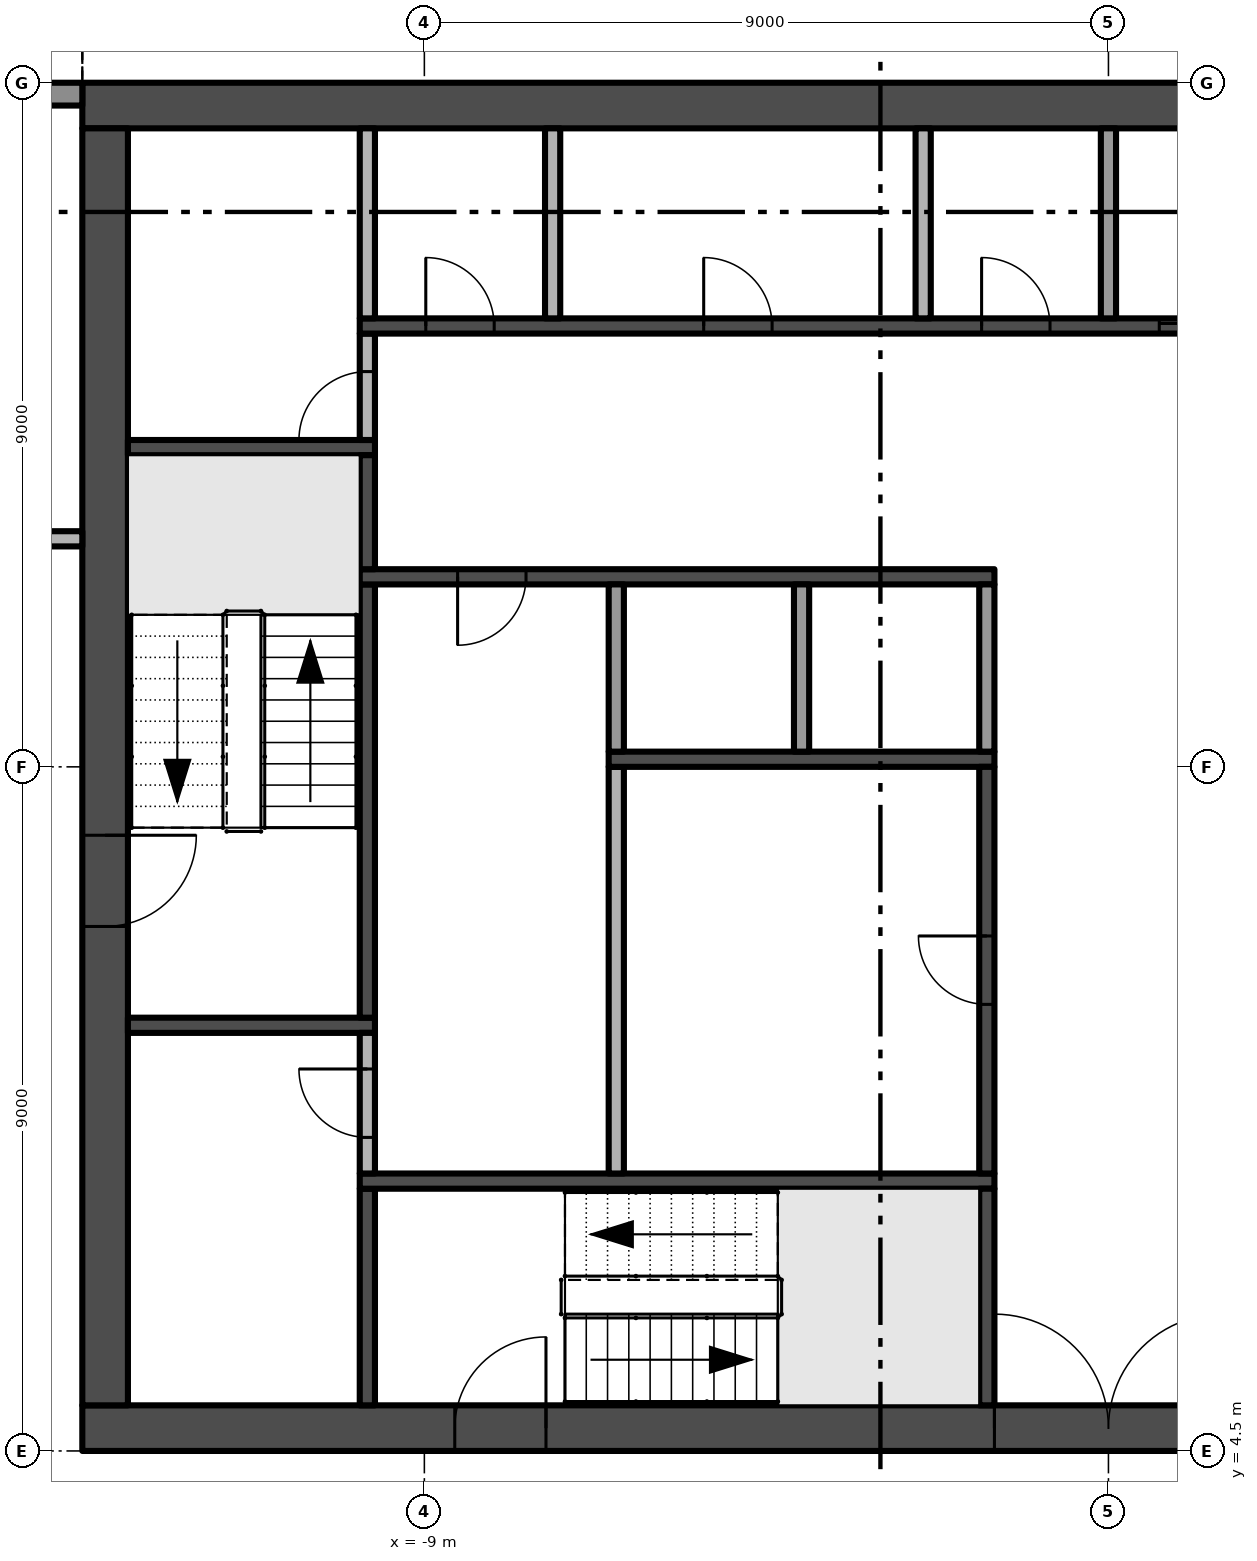
"""IFC4 building model, lengths in metres.
Left out: names, types, materials, properties, quantities, classifications, styles, units other than length and angle.
Written with IfcOpenShell. Run it as: python <this file> out.ifc"""

import sys

from ifc_helpers import new_model, si_unit, direction, frame, frame_2d, origin, place, context, subcontext, project, spatial, polyline, rectangle, outline, extrude, element, fill, save


model = new_model("IFC4")
c1 = context("Model", 3, precision=1e-05, world=origin(), true_north=direction((0.0, 1.0)))
c2 = subcontext(c1, "Body", "Model", "MODEL_VIEW")
j1 = project(units=[si_unit("LENGTHUNIT", "METRE"), si_unit("PLANEANGLEUNIT", "RADIAN")], contexts=[c1])
p1 = place(None, origin())
s1 = spatial("IfcSite", under=j1, at=p1, CompositionType="ELEMENT")
p2 = place(p1, origin())
s2 = spatial("IfcBuilding", under=s1, at=p2, CompositionType="ELEMENT")
p3 = place(p2, frame((0.0, 0.0, 250.2)))
s3 = spatial("IfcBuildingStorey", under=s2, at=p3, CompositionType="ELEMENT", Elevation=250.2)
p4 = place(p3, frame((-13.5, 4.8, -0.3), z_axis=(0.0, 0.0, 1.0), x_axis=(1.0, 0.0, 0.0)))
e1 = element("IfcWall", 1, at=p4, inside=s3, PredefinedType="SHEAR", context=c2, shape_type="SweptSolid", body=[
    extrude(rectangle(XDim=27.0, YDim=0.6, at=frame_2d((13.5, 0.0))), origin(), (0.0, 0.0, 1.0), 3.8),
])
p5 = place(p4, frame((12.0, 0.0, 0.3)))
e2 = element("IfcOpeningElement", 2, at=p5, cuts=e1, PredefinedType="OPENING", context=c2, shape_type="SweptSolid", body=[
    extrude(rectangle(XDim=3.0, YDim=2.4, at=frame_2d((1.5, 1.2))), frame((0.0, 0.31, 0.0), z_axis=(0.0, -1.0, 0.0), x_axis=(1.0, 0.0, 0.0)), (0.0, 0.0, 1.0), 0.62),
])
p6 = place(p4, frame((4.9, 0.0, 0.3)))
e3 = element("IfcOpeningElement", 3, at=p6, cuts=e1, PredefinedType="OPENING", context=c2, shape_type="SweptSolid", body=[
    extrude(rectangle(XDim=1.2, YDim=2.2, at=frame_2d((0.6, 1.1))), frame((0.0, 0.31, 0.0), z_axis=(0.0, -1.0, 0.0), x_axis=(1.0, 0.0, 0.0)), (0.0, 0.0, 1.0), 0.62),
])
p7 = place(p4, frame((20.75, 0.0, 0.3)))
e4 = element("IfcOpeningElement", 4, at=p7, cuts=e1, PredefinedType="OPENING", context=c2, shape_type="SweptSolid", body=[
    extrude(rectangle(XDim=1.5, YDim=2.2, at=frame_2d((0.75, 1.1))), frame((0.0, 0.31, 0.0), z_axis=(0.0, -1.0, 0.0), x_axis=(1.0, 0.0, 0.0)), (0.0, 0.0, 1.0), 0.62),
])
p8 = place(p4, frame((17.4, 0.0, 0.3)))
e5 = element("IfcOpeningElement", 5, at=p8, cuts=e1, PredefinedType="OPENING", context=c2, shape_type="SweptSolid", body=[
    extrude(rectangle(XDim=1.2, YDim=2.2, at=frame_2d((0.6, 1.1))), frame((0.0, 0.31, 0.0), z_axis=(0.0, -1.0, 0.0), x_axis=(1.0, 0.0, 0.0)), (0.0, 0.0, 1.0), 0.62),
])
p9 = place(p3, frame((13.5, 22.2, -0.3), z_axis=(0.0, 0.0, 1.0), x_axis=(-1.0, 0.0, 0.0)))
e6 = element("IfcWall", 6, at=p9, inside=s3, PredefinedType="SHEAR", context=c2, shape_type="SweptSolid", body=[
    extrude(rectangle(XDim=27.0, YDim=0.6, at=frame_2d((13.5, 0.0))), origin(), (0.0, 0.0, 1.0), 3.8),
])
p10 = place(p3, frame((-13.2, 21.9, -0.3), z_axis=(0.0, 0.0, 1.0), x_axis=(0.0, -1.0, 0.0)))
e7 = element("IfcWall", 7, at=p10, inside=s3, PredefinedType="SHEAR", context=c2, shape_type="SweptSolid", body=[
    extrude(rectangle(XDim=16.8, YDim=0.6, at=frame_2d((8.4, 0.0))), origin(), (0.0, 0.0, 1.0), 3.8),
])
p11 = place(p10, frame((9.3, 0.0, 0.3)))
e8 = element("IfcOpeningElement", 8, at=p11, cuts=e7, PredefinedType="OPENING", context=c2, shape_type="SweptSolid", body=[
    extrude(rectangle(XDim=1.2, YDim=2.2, at=frame_2d((0.6, 1.1))), frame((0.0, 0.31, 0.0), z_axis=(0.0, -1.0, 0.0), x_axis=(1.0, 0.0, 0.0)), (0.0, 0.0, 1.0), 0.62),
])
p12 = place(p3, frame((-17.55, 22.35, 0.0), z_axis=(0.0, 0.0, 1.0), x_axis=(1.0, 0.0, 0.0)))
e9 = element("IfcWall", 9, at=p12, inside=s3, PredefinedType="SOLIDWALL", context=c2, shape_type="SweptSolid", body=[
    extrude(rectangle(XDim=4.05, YDim=0.3, at=frame_2d((2.025, 0.0))), origin(), (0.0, 0.0, 1.0), 3.5),
])
p13 = place(p12, frame((0.3, 0.0, 0.0)))
e10 = element("IfcOpeningElement", 10, at=p13, cuts=e9, PredefinedType="OPENING", context=c2, shape_type="SweptSolid", body=[
    extrude(rectangle(XDim=3.2, YDim=2.4, at=frame_2d((1.6, 1.2))), frame((0.0, 0.16, 0.0), z_axis=(0.0, -1.0, 0.0), x_axis=(1.0, 0.0, 0.0)), (0.0, 0.0, 1.0), 0.32),
])
p14 = place(p3, origin())
e11 = element("IfcWall", 11, at=p14, inside=s3, PredefinedType="USERDEFINED", context=c2, shape_type="SweptSolid", body=[
    extrude(outline(polyline([(-13.5, 25.5), (-15.0, 25.271), (-16.5, 24.671), (-18.0, 23.929), (-19.5, 23.329), (-21.0, 23.1), (-22.5, 23.329), (-22.538, 23.082), (-21.0, 22.847), (-19.434, 23.086), (-17.898, 23.701), (-16.398, 24.442), (-14.934, 25.028), (-13.462, 25.253), (-13.5, 25.5)])), origin(), (0.0, 0.0, 1.0), 0.9),
])
for number, where, z_axis, x_axis in (
    (12, (-12.9, 10.1, 0.0), (0.0, 0.0, 1.0), (1.0, 0.0, 0.0)),
    (13, (-12.9, 17.7, 0.0), (0.0, 0.0, 1.0), (1.0, 0.0, 0.0)),
):
    element("IfcWall", number, at=place(p3, frame(where, z_axis=z_axis, x_axis=x_axis)), inside=s3, PredefinedType="SHEAR", context=c2, shape_type="SweptSolid", body=[
        extrude(rectangle(XDim=3.25, YDim=0.2, at=frame_2d((1.625, 0.0))), origin(), (0.0, 0.0, 1.0), 3.5),
    ])
p15 = place(p3, frame((-9.75, 5.1, 0.0), z_axis=(0.0, 0.0, 1.0), x_axis=(0.0, 1.0, 0.0)))
e14 = element("IfcWall", 14, at=p15, inside=s3, PredefinedType="SHEAR", context=c2, shape_type="SweptSolid", body=[
    extrude(rectangle(XDim=2.85, YDim=0.2, at=frame_2d((1.425, 0.0))), origin(), (0.0, 0.0, 1.0), 3.5),
])
p16 = place(p3, frame((-9.85, 8.05, 0.0), z_axis=(0.0, 0.0, 1.0), x_axis=(1.0, 0.0, 0.0)))
e15 = element("IfcWall", 15, at=p16, inside=s3, PredefinedType="SHEAR", context=c2, shape_type="SweptSolid", body=[
    extrude(rectangle(XDim=8.35, YDim=0.2, at=frame_2d((4.175, 0.0))), origin(), (0.0, 0.0, 1.0), 3.5),
])
p17 = place(p3, frame((-9.75, 8.15, 0.0), z_axis=(0.0, 0.0, 1.0), x_axis=(0.0, 1.0, 0.0)))
e16 = element("IfcWall", 16, at=p17, inside=s3, PredefinedType="PARTITIONING", context=c2, shape_type="SweptSolid", body=[
    extrude(rectangle(XDim=1.85, YDim=0.2, at=frame_2d((0.925, 0.0))), origin(), (0.0, 0.0, 1.0), 3.5),
])
p18 = place(p17, frame((0.475, 0.0, 0.0)))
e17 = element("IfcOpeningElement", 17, at=p18, cuts=e16, PredefinedType="OPENING", context=c2, shape_type="SweptSolid", body=[
    extrude(rectangle(XDim=0.9, YDim=2.1, at=frame_2d((0.45, 1.05))), frame((0.0, 0.11, 0.0), z_axis=(0.0, -1.0, 0.0), x_axis=(1.0, 0.0, 0.0)), (0.0, 0.0, 1.0), 0.22),
])
p19 = place(p3, frame((-9.75, 10.2, 0.0), z_axis=(0.0, 0.0, 1.0), x_axis=(0.0, 1.0, 0.0)))
e18 = element("IfcWall", 18, at=p19, inside=s3, PredefinedType="SHEAR", context=c2, shape_type="SweptSolid", body=[
    extrude(rectangle(XDim=5.7, YDim=0.2, at=frame_2d((2.85, 0.0))), origin(), (0.0, 0.0, 1.0), 3.5),
])
p20 = place(p3, frame((-1.5, 16.0, 0.0), z_axis=(0.0, 0.0, 1.0), x_axis=(-1.0, 0.0, 0.0)))
e19 = element("IfcWall", 19, at=p20, inside=s3, PredefinedType="SHEAR", context=c2, shape_type="SweptSolid", body=[
    extrude(rectangle(XDim=8.35, YDim=0.2, at=frame_2d((4.175, 0.0))), origin(), (0.0, 0.0, 1.0), 3.5),
])
p21 = place(p20, frame((6.162, 0.0, 0.0)))
e20 = element("IfcOpeningElement", 20, at=p21, cuts=e19, PredefinedType="OPENING", context=c2, shape_type="SweptSolid", body=[
    extrude(rectangle(XDim=0.9, YDim=2.1, at=frame_2d((0.45, 1.05))), frame((0.0, 0.11, 0.0), z_axis=(0.0, -1.0, 0.0), x_axis=(1.0, 0.0, 0.0)), (0.0, 0.0, 1.0), 0.22),
])
p22 = place(p3, frame((-9.75, 16.1, 0.0), z_axis=(0.0, 0.0, 1.0), x_axis=(0.0, 1.0, 0.0)))
e21 = element("IfcWall", 21, at=p22, inside=s3, PredefinedType="SHEAR", context=c2, shape_type="SweptSolid", body=[
    extrude(rectangle(XDim=1.5, YDim=0.2, at=frame_2d((0.75, 0.0))), origin(), (0.0, 0.0, 1.0), 3.5),
])
p23 = place(p3, frame((-9.75, 17.8, 0.0), z_axis=(0.0, 0.0, 1.0), x_axis=(0.0, 1.0, 0.0)))
e22 = element("IfcWall", 22, at=p23, inside=s3, PredefinedType="PARTITIONING", context=c2, shape_type="SweptSolid", body=[
    extrude(rectangle(XDim=1.4, YDim=0.2, at=frame_2d((0.7, 0.0))), origin(), (0.0, 0.0, 1.0), 3.5),
])
p24 = place(p23, origin())
e23 = element("IfcOpeningElement", 23, at=p24, cuts=e22, PredefinedType="OPENING", context=c2, shape_type="SweptSolid", body=[
    extrude(rectangle(XDim=0.9, YDim=2.1, at=frame_2d((0.45, 1.05))), frame((0.0, 0.11, 0.0), z_axis=(0.0, -1.0, 0.0), x_axis=(1.0, 0.0, 0.0)), (0.0, 0.0, 1.0), 0.22),
])
p25 = place(p3, frame((-9.85, 19.3, 0.0), z_axis=(0.0, 0.0, 1.0), x_axis=(1.0, 0.0, 0.0)))
e24 = element("IfcWall", 24, at=p25, inside=s3, PredefinedType="SHEAR", context=c2, shape_type="SweptSolid", body=[
    extrude(rectangle(XDim=19.7, YDim=0.2, at=frame_2d((9.85, 0.0))), origin(), (0.0, 0.0, 1.0), 3.5),
])
p26 = place(p25, frame((10.519, 0.0, 0.0)))
e25 = element("IfcOpeningElement", 25, at=p26, cuts=e24, PredefinedType="OPENING", context=c2, shape_type="SweptSolid", body=[
    extrude(rectangle(XDim=1.1, YDim=2.1, at=frame_2d((0.55, 1.05))), frame((0.0, 0.11, 0.0), z_axis=(0.0, -1.0, 0.0), x_axis=(1.0, 0.0, 0.0)), (0.0, 0.0, 1.0), 0.22),
])
p27 = place(p25, frame((12.956, 0.0, 0.0)))
e26 = element("IfcOpeningElement", 26, at=p27, cuts=e24, PredefinedType="OPENING", context=c2, shape_type="SweptSolid", body=[
    extrude(rectangle(XDim=1.1, YDim=2.1, at=frame_2d((0.55, 1.05))), frame((0.0, 0.11, 0.0), z_axis=(0.0, -1.0, 0.0), x_axis=(1.0, 0.0, 0.0)), (0.0, 0.0, 1.0), 0.22),
])
p28 = place(p25, frame((15.394, 0.0, 0.0)))
e27 = element("IfcOpeningElement", 27, at=p28, cuts=e24, PredefinedType="OPENING", context=c2, shape_type="SweptSolid", body=[
    extrude(rectangle(XDim=1.1, YDim=2.1, at=frame_2d((0.55, 1.05))), frame((0.0, 0.11, 0.0), z_axis=(0.0, -1.0, 0.0), x_axis=(1.0, 0.0, 0.0)), (0.0, 0.0, 1.0), 0.22),
])
p29 = place(p25, frame((17.831, 0.0, 0.0)))
e28 = element("IfcOpeningElement", 28, at=p29, cuts=e24, PredefinedType="OPENING", context=c2, shape_type="SweptSolid", body=[
    extrude(rectangle(XDim=1.1, YDim=2.1, at=frame_2d((0.55, 1.05))), frame((0.0, 0.11, 0.0), z_axis=(0.0, -1.0, 0.0), x_axis=(1.0, 0.0, 0.0)), (0.0, 0.0, 1.0), 0.22),
])
p30 = place(p25, frame((0.869, 0.0, 0.0)))
e29 = element("IfcOpeningElement", 29, at=p30, cuts=e24, PredefinedType="OPENING", context=c2, shape_type="SweptSolid", body=[
    extrude(rectangle(XDim=0.9, YDim=2.1, at=frame_2d((0.45, 1.05))), frame((0.0, 0.11, 0.0), z_axis=(0.0, -1.0, 0.0), x_axis=(1.0, 0.0, 0.0)), (0.0, 0.0, 1.0), 0.22),
])
p31 = place(p25, frame((4.525, 0.0, 0.0)))
e30 = element("IfcOpeningElement", 30, at=p31, cuts=e24, PredefinedType="OPENING", context=c2, shape_type="SweptSolid", body=[
    extrude(rectangle(XDim=0.9, YDim=2.1, at=frame_2d((0.45, 1.05))), frame((0.0, 0.11, 0.0), z_axis=(0.0, -1.0, 0.0), x_axis=(1.0, 0.0, 0.0)), (0.0, 0.0, 1.0), 0.22),
])
p32 = place(p25, frame((8.181, 0.0, 0.0)))
e31 = element("IfcOpeningElement", 31, at=p32, cuts=e24, PredefinedType="OPENING", context=c2, shape_type="SweptSolid", body=[
    extrude(rectangle(XDim=0.9, YDim=2.1, at=frame_2d((0.45, 1.05))), frame((0.0, 0.11, 0.0), z_axis=(0.0, -1.0, 0.0), x_axis=(1.0, 0.0, 0.0)), (0.0, 0.0, 1.0), 0.22),
])
for number, where, z_axis, x_axis in (
    (32, (-9.75, 19.4, 0.0), (0.0, 0.0, 1.0), (0.0, 1.0, 0.0)),
    (33, (-7.312, 19.4, 0.0), (0.0, 0.0, 1.0), (0.0, 1.0, 0.0)),
):
    element("IfcWall", number, at=place(p3, frame(where, z_axis=z_axis, x_axis=x_axis)), inside=s3, PredefinedType="PARTITIONING", context=c2, shape_type="SweptSolid", body=[
        extrude(rectangle(XDim=2.5, YDim=0.2, at=frame_2d((1.25, 0.0))), origin(), (0.0, 0.0, 1.0), 3.5),
    ])
p33 = place(p3, frame((-6.475, 8.15, 0.0), z_axis=(0.0, 0.0, 1.0), x_axis=(0.0, 1.0, 0.0)))
e34 = element("IfcWall", 34, at=p33, inside=s3, PredefinedType="PARTITIONING", context=c2, shape_type="SweptSolid", body=[
    extrude(rectangle(XDim=5.35, YDim=0.2, at=frame_2d((2.675, 0.0))), origin(), (0.0, 0.0, 1.0), 3.5),
])
p34 = place(p3, frame((-6.575, 13.6, 0.0), z_axis=(0.0, 0.0, 1.0), x_axis=(1.0, 0.0, 0.0)))
e35 = element("IfcWall", 35, at=p34, inside=s3, PredefinedType="SHEAR", context=c2, shape_type="SweptSolid", body=[
    extrude(rectangle(XDim=5.075, YDim=0.2, at=frame_2d((2.538, 0.0))), origin(), (0.0, 0.0, 1.0), 3.5),
])
for number, where, z_axis, x_axis in (
    (36, (-6.475, 13.7, 0.0), (0.0, 0.0, 1.0), (0.0, 1.0, 0.0)),
    (37, (-4.037, 13.7, 0.0), (0.0, 0.0, 1.0), (0.0, 1.0, 0.0)),
):
    element("IfcWall", number, at=place(p3, frame(where, z_axis=z_axis, x_axis=x_axis)), inside=s3, PredefinedType="PARTITIONING", context=c2, shape_type="SweptSolid", body=[
        extrude(rectangle(XDim=2.2, YDim=0.2, at=frame_2d((1.1, 0.0))), origin(), (0.0, 0.0, 1.0), 3.5),
    ])
p35 = place(p3, frame((-2.438, 19.4, 0.0), z_axis=(0.0, 0.0, 1.0), x_axis=(0.0, 1.0, 0.0)))
e38 = element("IfcWall", 38, at=p35, inside=s3, PredefinedType="PARTITIONING", context=c2, shape_type="SweptSolid", body=[
    extrude(rectangle(XDim=2.5, YDim=0.2, at=frame_2d((1.25, 0.0))), origin(), (0.0, 0.0, 1.0), 3.5),
])
p36 = place(p3, frame((-1.6, 5.1, 0.0), z_axis=(0.0, 0.0, 1.0), x_axis=(0.0, 1.0, 0.0)))
e39 = element("IfcWall", 39, at=p36, inside=s3, PredefinedType="SHEAR", context=c2, shape_type="SweptSolid", body=[
    extrude(rectangle(XDim=2.85, YDim=0.2, at=frame_2d((1.425, 0.0))), origin(), (0.0, 0.0, 1.0), 3.5),
])
p37 = place(p3, frame((-1.6, 8.15, 0.0), z_axis=(0.0, 0.0, 1.0), x_axis=(0.0, 1.0, 0.0)))
e40 = element("IfcWall", 40, at=p37, inside=s3, PredefinedType="SHEAR", context=c2, shape_type="SweptSolid", body=[
    extrude(rectangle(XDim=5.35, YDim=0.2, at=frame_2d((2.675, 0.0))), origin(), (0.0, 0.0, 1.0), 3.5),
])
p38 = place(p37, frame((2.225, 0.0, 0.0)))
e41 = element("IfcOpeningElement", 41, at=p38, cuts=e40, PredefinedType="OPENING", context=c2, shape_type="SweptSolid", body=[
    extrude(rectangle(XDim=0.9, YDim=2.1, at=frame_2d((0.45, 1.05))), frame((0.0, 0.11, 0.0), z_axis=(0.0, -1.0, 0.0), x_axis=(1.0, 0.0, 0.0)), (0.0, 0.0, 1.0), 0.22),
])
p39 = place(p3, frame((-1.6, 13.7, 0.0), z_axis=(0.0, 0.0, 1.0), x_axis=(0.0, 1.0, 0.0)))
e42 = element("IfcWall", 42, at=p39, inside=s3, PredefinedType="PARTITIONING", context=c2, shape_type="SweptSolid", body=[
    extrude(rectangle(XDim=2.2, YDim=0.2, at=frame_2d((1.1, 0.0))), origin(), (0.0, 0.0, 1.0), 3.5),
])
p40 = place(p3, frame((0.0, 19.4, 0.0), z_axis=(0.0, 0.0, 1.0), x_axis=(0.0, 1.0, 0.0)))
e43 = element("IfcWall", 43, at=p40, inside=s3, PredefinedType="PARTITIONING", context=c2, shape_type="SweptSolid", body=[
    extrude(rectangle(XDim=2.5, YDim=0.2, at=frame_2d((1.25, 0.0))), origin(), (0.0, 0.0, 1.0), 3.5),
])
p41 = place(p3, frame((-17.325, 16.5, 0.0), z_axis=(0.0, 0.0, 1.0), x_axis=(1.0, 0.0, 0.0)))
e44 = element("IfcWall", 44, at=p41, inside=s3, PredefinedType="PARTITIONING", context=c2, shape_type="SweptSolid", body=[
    extrude(rectangle(XDim=3.825, YDim=0.2, at=frame_2d((1.913, 0.0))), origin(), (0.0, 0.0, 1.0), 3.5),
])
p42 = place(p41, frame((1.35, 0.0, 0.0)))
e45 = element("IfcOpeningElement", 45, at=p42, cuts=e44, PredefinedType="OPENING", context=c2, shape_type="SweptSolid", body=[
    extrude(rectangle(XDim=0.9, YDim=2.1, at=frame_2d((0.45, 1.05))), frame((0.0, 0.11, 0.0), z_axis=(0.0, -1.0, 0.0), x_axis=(1.0, 0.0, 0.0)), (0.0, 0.0, 1.0), 0.22),
])
p43 = place(p5, frame((3.0, 0.0, 0.0), z_axis=(0.0, 0.0, 1.0), x_axis=(-1.0, 0.0, 0.0)))
e46 = element("IfcDoor", 46, at=p43, inside=s3, OperationType="DOUBLE_DOOR_SINGLE_SWING", PredefinedType="DOOR", context=c2, shape_type="SweptSolid", body=[
    extrude(rectangle(XDim=3.0, YDim=2.4, at=frame_2d((1.5, 1.2))), frame((0.0, 0.025, 0.0), z_axis=(0.0, -1.0, 0.0), x_axis=(1.0, 0.0, 0.0)), (0.0, 0.0, 1.0), 0.05),
])
fill(e2, e46)
p44 = place(p11, frame((1.2, 0.0, 0.0), z_axis=(0.0, 0.0, 1.0), x_axis=(-1.0, 0.0, 0.0)))
e47 = element("IfcDoor", 47, at=p44, inside=s3, OperationType="SINGLE_SWING_RIGHT", PredefinedType="DOOR", context=c2, shape_type="SweptSolid", body=[
    extrude(rectangle(XDim=1.2, YDim=2.2, at=frame_2d((0.6, 1.1))), frame((0.0, 0.025, 0.0), z_axis=(0.0, -1.0, 0.0), x_axis=(1.0, 0.0, 0.0)), (0.0, 0.0, 1.0), 0.05),
])
fill(e8, e47)
p45 = place(p6, frame((1.2, 0.0, 0.0), z_axis=(0.0, 0.0, 1.0), x_axis=(-1.0, 0.0, 0.0)))
e48 = element("IfcDoor", 48, at=p45, inside=s3, OperationType="SINGLE_SWING_LEFT", PredefinedType="DOOR", context=c2, shape_type="SweptSolid", body=[
    extrude(rectangle(XDim=1.2, YDim=2.2, at=frame_2d((0.6, 1.1))), frame((0.0, 0.025, 0.0), z_axis=(0.0, -1.0, 0.0), x_axis=(1.0, 0.0, 0.0)), (0.0, 0.0, 1.0), 0.05),
])
fill(e3, e48)
p46 = place(p26, origin())
e49 = element("IfcDoor", 49, at=p46, inside=s3, OperationType="SLIDING_TO_RIGHT", PredefinedType="DOOR", context=c2, shape_type="SweptSolid", body=[
    extrude(rectangle(XDim=1.1, YDim=2.1, at=frame_2d((0.55, 1.05))), frame((0.0, 0.025, 0.0), z_axis=(0.0, -1.0, 0.0), x_axis=(1.0, 0.0, 0.0)), (0.0, 0.0, 1.0), 0.05),
])
fill(e25, e49)
p47 = place(p21, origin())
e50 = element("IfcDoor", 50, at=p47, inside=s3, OperationType="SINGLE_SWING_RIGHT", PredefinedType="DOOR", context=c2, shape_type="SweptSolid", body=[
    extrude(rectangle(XDim=0.9, YDim=2.1, at=frame_2d((0.45, 1.05))), frame((0.0, 0.025, 0.0), z_axis=(0.0, -1.0, 0.0), x_axis=(1.0, 0.0, 0.0)), (0.0, 0.0, 1.0), 0.05),
])
fill(e20, e50)
p48 = place(p38, origin())
e51 = element("IfcDoor", 51, at=p48, inside=s3, OperationType="SINGLE_SWING_RIGHT", PredefinedType="DOOR", context=c2, shape_type="SweptSolid", body=[
    extrude(rectangle(XDim=0.9, YDim=2.1, at=frame_2d((0.45, 1.05))), frame((0.0, 0.025, 0.0), z_axis=(0.0, -1.0, 0.0), x_axis=(1.0, 0.0, 0.0)), (0.0, 0.0, 1.0), 0.05),
])
fill(e41, e51)
p49 = place(p24, origin())
e52 = element("IfcDoor", 52, at=p49, inside=s3, OperationType="SINGLE_SWING_LEFT", PredefinedType="DOOR", context=c2, shape_type="SweptSolid", body=[
    extrude(rectangle(XDim=0.9, YDim=2.1, at=frame_2d((0.45, 1.05))), frame((0.0, 0.025, 0.0), z_axis=(0.0, -1.0, 0.0), x_axis=(1.0, 0.0, 0.0)), (0.0, 0.0, 1.0), 0.05),
])
fill(e23, e52)
p50 = place(p30, origin())
e53 = element("IfcDoor", 53, at=p50, inside=s3, OperationType="SINGLE_SWING_LEFT", PredefinedType="DOOR", context=c2, shape_type="SweptSolid", body=[
    extrude(rectangle(XDim=0.9, YDim=2.1, at=frame_2d((0.45, 1.05))), frame((0.0, 0.025, 0.0), z_axis=(0.0, -1.0, 0.0), x_axis=(1.0, 0.0, 0.0)), (0.0, 0.0, 1.0), 0.05),
])
fill(e29, e53)
p51 = place(p31, origin())
e54 = element("IfcDoor", 54, at=p51, inside=s3, OperationType="SINGLE_SWING_LEFT", PredefinedType="DOOR", context=c2, shape_type="SweptSolid", body=[
    extrude(rectangle(XDim=0.9, YDim=2.1, at=frame_2d((0.45, 1.05))), frame((0.0, 0.025, 0.0), z_axis=(0.0, -1.0, 0.0), x_axis=(1.0, 0.0, 0.0)), (0.0, 0.0, 1.0), 0.05),
])
fill(e30, e54)
p52 = place(p32, origin())
e55 = element("IfcDoor", 55, at=p52, inside=s3, OperationType="SINGLE_SWING_LEFT", PredefinedType="DOOR", context=c2, shape_type="SweptSolid", body=[
    extrude(rectangle(XDim=0.9, YDim=2.1, at=frame_2d((0.45, 1.05))), frame((0.0, 0.025, 0.0), z_axis=(0.0, -1.0, 0.0), x_axis=(1.0, 0.0, 0.0)), (0.0, 0.0, 1.0), 0.05),
])
fill(e31, e55)
p53 = place(p18, origin())
e56 = element("IfcDoor", 56, at=p53, inside=s3, OperationType="SINGLE_SWING_RIGHT", PredefinedType="DOOR", context=c2, shape_type="SweptSolid", body=[
    extrude(rectangle(XDim=0.9, YDim=2.1, at=frame_2d((0.45, 1.05))), frame((0.0, 0.025, 0.0), z_axis=(0.0, -1.0, 0.0), x_axis=(1.0, 0.0, 0.0)), (0.0, 0.0, 1.0), 0.05),
])
fill(e17, e56)
save(model, sys.argv[1])
